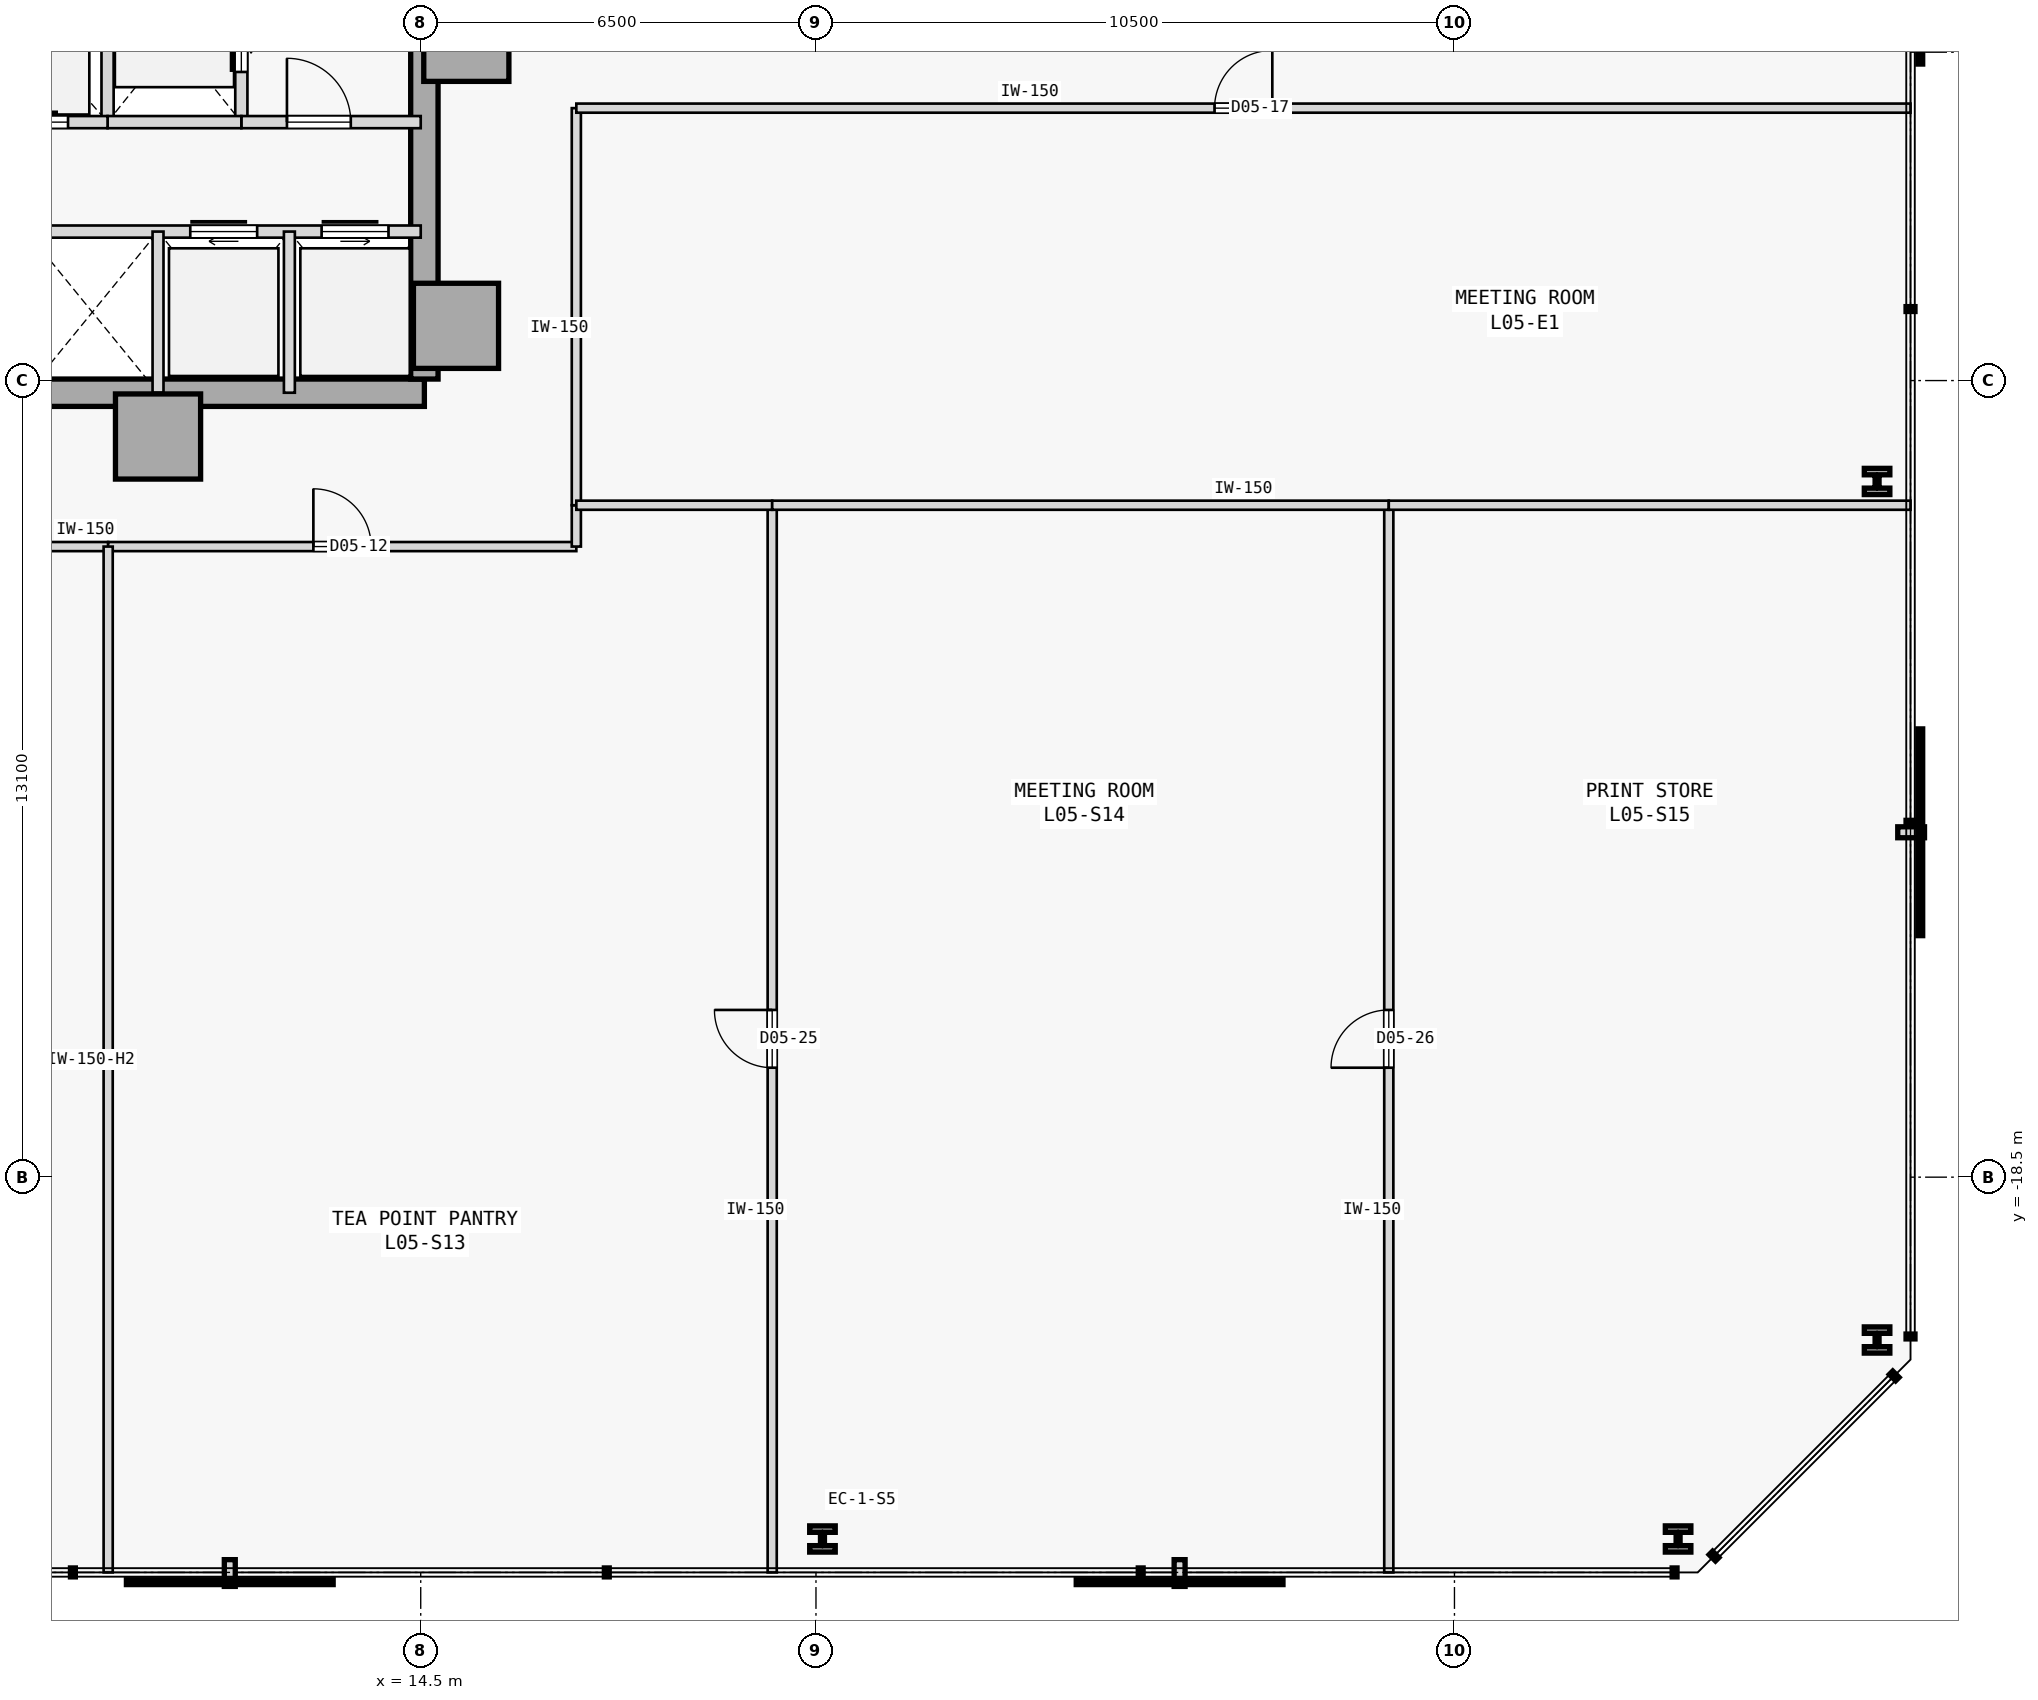
"""IFC4 building model, lengths in metres.
Left out: names, types, materials, properties, quantities, classifications, styles, units other than length and angle.
Written with IfcOpenShell. Run it as: python <this file> out.ifc"""

import sys

from ifc_helpers import new_model, si_unit, direction, frame, frame_2d, origin, origin_2d, place, context, subcontext, project, spatial, rectangle, i_section, extrude, element, fill, save


model = new_model("IFC4")
c1 = context("Model", 3, precision=1e-05, world=origin(), true_north=direction((0.0, 1.0)))
c2 = subcontext(c1, "Body", "Model", "MODEL_VIEW")
j1 = project(units=[si_unit("LENGTHUNIT", "METRE"), si_unit("PLANEANGLEUNIT", "RADIAN")], contexts=[c1])
p1 = place(None, origin())
s1 = spatial("IfcSite", under=j1, at=p1, CompositionType="ELEMENT")
p2 = place(p1, origin())
s2 = spatial("IfcBuilding", under=s1, at=p2, CompositionType="ELEMENT")
p3 = place(p2, frame((0.0, 0.0, 25.6)))
s3 = spatial("IfcBuildingStorey", under=s2, at=p3, CompositionType="ELEMENT", Elevation=25.6)
for number, where, z_axis, x_axis in (
    (1, (15.25, 0.22, 0.0), (0.0, 0.0, 1.0), (1.0, 0.0, 0.0)),
    (2, (15.08, -4.5, 0.0), (0.0, 0.0, 1.0), (1.0, 0.0, 0.0)),
    (3, (10.18, -6.32, 0.0), (0.0, 0.0, 1.0), (1.0, 0.0, 0.0)),
):
    element("IfcColumn", number, at=place(p3, frame(where, z_axis=z_axis, x_axis=x_axis)), inside=s3, PredefinedType="COLUMN", context=c2, shape_type="SweptSolid", body=[
        extrude(rectangle(XDim=1.4, YDim=1.4, at=origin_2d()), origin(), (0.0, 0.0, 1.0), 3.8),
    ])
p4 = place(p3, frame((3.7, -5.6, 0.0), z_axis=(0.0, 0.0, 1.0), x_axis=(1.0, 0.0, 0.0)))
e4 = element("IfcWall", 4, at=p4, inside=s3, PredefinedType="SHEAR", context=c2, shape_type="SweptSolid", body=[
    extrude(rectangle(XDim=10.86, YDim=0.45, at=frame_2d((5.43, 0.0))), origin(), (0.0, 0.0, 1.0), 3.575),
])
p5 = place(p3, frame((14.56, -5.375, 0.0), z_axis=(0.0, 0.0, 1.0), x_axis=(0.0, 1.0, 0.0)))
e5 = element("IfcWall", 5, at=p5, inside=s3, PredefinedType="SHEAR", context=c2, shape_type="SweptSolid", body=[
    extrude(rectangle(XDim=10.75, YDim=0.45, at=frame_2d((5.375, 0.0))), origin(), (0.0, 0.0, 1.0), 3.575),
])
for number, where, z_axis, x_axis in (
    (6, (21.107, -24.45, 0.0), (0.0, 0.0, 1.0), (1.0, 0.0, 0.0)),
    (7, (35.178, -24.45, 0.0), (0.0, 0.0, 1.0), (1.0, 0.0, 0.0)),
    (8, (38.45, -21.178, 0.0), (0.0, 0.0, 1.0), (1.0, 0.0, 0.0)),
    (9, (38.45, -7.059, 0.0), (0.0, 0.0, 1.0), (1.0, 0.0, 0.0)),
):
    element("IfcColumn", number, at=place(p3, frame(where, z_axis=z_axis, x_axis=x_axis)), inside=s3, PredefinedType="COLUMN", context=c2, shape_type="SweptSolid", body=[
        extrude(i_section(OverallWidth=0.42, OverallDepth=0.431, WebThickness=0.065, FlangeThickness=0.106, FilletRadius=0.015, at=origin_2d()), origin(), (0.0, 0.0, 1.0), 3.8),
    ])
p6 = place(p3, frame((11.55, -1.15, 0.0), z_axis=(0.0, 0.0, 1.0), x_axis=(0.0, 1.0, 0.0)))
e10 = element("IfcWall", 10, at=p6, inside=s3, PredefinedType="STANDARD", context=c2, shape_type="SweptSolid", body=[
    extrude(rectangle(XDim=2.75, YDim=0.2, at=frame_2d((1.375, 0.0))), origin(), (0.0, 0.0, 1.0), 3.575),
])
p7 = place(p6, frame((0.825, 0.0, 0.0)))
e11 = element("IfcOpeningElement", 11, at=p7, cuts=e10, PredefinedType="OPENING", context=c2, shape_type="SweptSolid", body=[
    extrude(rectangle(XDim=1.1, YDim=2.15, at=frame_2d((0.55, 1.075))), frame((0.0, 0.11, 0.0), z_axis=(0.0, -1.0, 0.0), x_axis=(1.0, 0.0, 0.0)), (0.0, 0.0, 1.0), 0.22),
])
p8 = place(p3, frame((9.35, -1.15, 0.0), z_axis=(0.0, 0.0, 1.0), x_axis=(0.0, 1.0, 0.0)))
e12 = element("IfcWall", 12, at=p8, inside=s3, PredefinedType="STANDARD", context=c2, shape_type="SweptSolid", body=[
    extrude(rectangle(XDim=2.75, YDim=0.2, at=frame_2d((1.375, 0.0))), origin(), (0.0, 0.0, 1.0), 3.575),
])
p9 = place(p3, frame((11.55, -1.15, 0.0), z_axis=(0.0, 0.0, 1.0), x_axis=(1.0, 0.0, 0.0)))
e13 = element("IfcWall", 13, at=p9, inside=s3, PredefinedType="STANDARD", context=c2, shape_type="SweptSolid", body=[
    extrude(rectangle(XDim=2.95, YDim=0.2, at=frame_2d((1.475, 0.0))), origin(), (0.0, 0.0, 1.0), 3.575),
])
p10 = place(p9, frame((0.75, 0.0, 0.0)))
e14 = element("IfcOpeningElement", 14, at=p10, cuts=e13, PredefinedType="OPENING", context=c2, shape_type="SweptSolid", body=[
    extrude(rectangle(XDim=1.05, YDim=2.18, at=frame_2d((0.525, 1.09))), frame((0.0, 0.11, 0.0), z_axis=(0.0, -1.0, 0.0), x_axis=(1.0, 0.0, 0.0)), (0.0, 0.0, 1.0), 0.22),
])
p11 = place(p3, frame((9.35, -1.15, 0.0), z_axis=(0.0, 0.0, 1.0), x_axis=(1.0, 0.0, 0.0)))
e15 = element("IfcWall", 15, at=p11, inside=s3, PredefinedType="STANDARD", context=c2, shape_type="SweptSolid", body=[
    extrude(rectangle(XDim=2.2, YDim=0.2, at=frame_2d((1.1, 0.0))), origin(), (0.0, 0.0, 1.0), 3.575),
])
p12 = place(p3, frame((6.95, -1.15, 0.0), z_axis=(0.0, 0.0, 1.0), x_axis=(1.0, 0.0, 0.0)))
e16 = element("IfcWall", 16, at=p12, inside=s3, PredefinedType="STANDARD", context=c2, shape_type="SweptSolid", body=[
    extrude(rectangle(XDim=2.4, YDim=0.2, at=frame_2d((1.2, 0.0))), origin(), (0.0, 0.0, 1.0), 3.575),
])
p13 = place(p12, frame((0.65, 0.0, 0.0)))
e17 = element("IfcOpeningElement", 17, at=p13, cuts=e16, PredefinedType="OPENING", context=c2, shape_type="SweptSolid", body=[
    extrude(rectangle(XDim=1.1, YDim=2.15, at=frame_2d((0.55, 1.075))), frame((0.0, 0.11, 0.0), z_axis=(0.0, -1.0, 0.0), x_axis=(1.0, 0.0, 0.0)), (0.0, 0.0, 1.0), 0.22),
])
p14 = place(p3, frame((3.7, -2.95, 0.0), z_axis=(0.0, 0.0, 1.0), x_axis=(1.0, 0.0, 0.0)))
e18 = element("IfcWall", 18, at=p14, inside=s3, PredefinedType="STANDARD", context=c2, shape_type="SweptSolid", body=[
    extrude(rectangle(XDim=10.8, YDim=0.2, at=frame_2d((5.4, 0.0))), origin(), (0.0, 0.0, 1.0), 3.575),
])
p15 = place(p14, frame((7.01, 0.0, 0.0)))
e19 = element("IfcOpeningElement", 19, at=p15, cuts=e18, PredefinedType="OPENING", context=c2, shape_type="SweptSolid", body=[
    extrude(rectangle(XDim=1.1, YDim=2.15, at=frame_2d((0.55, 1.075))), frame((0.0, 0.11, 0.0), z_axis=(0.0, -1.0, 0.0), x_axis=(1.0, 0.0, 0.0)), (0.0, 0.0, 1.0), 0.22),
])
p16 = place(p14, frame((9.17, 0.0, 0.0)))
e20 = element("IfcOpeningElement", 20, at=p16, cuts=e18, PredefinedType="OPENING", context=c2, shape_type="SweptSolid", body=[
    extrude(rectangle(XDim=1.1, YDim=2.15, at=frame_2d((0.55, 1.075))), frame((0.0, 0.11, 0.0), z_axis=(0.0, -1.0, 0.0), x_axis=(1.0, 0.0, 0.0)), (0.0, 0.0, 1.0), 0.22),
])
for number, where, z_axis, x_axis in (
    (21, (12.34, -5.6, 0.0), (0.0, 0.0, 1.0), (0.0, 1.0, 0.0)),
    (22, (10.18, -5.6, 0.0), (0.0, 0.0, 1.0), (0.0, 1.0, 0.0)),
):
    element("IfcWall", number, at=place(p3, frame(where, z_axis=z_axis, x_axis=x_axis)), inside=s3, PredefinedType="STANDARD", context=c2, shape_type="SweptSolid", body=[
        extrude(rectangle(XDim=2.65, YDim=0.18, at=frame_2d((1.325, 0.0))), origin(), (0.0, 0.0, 1.0), 3.575),
    ])
p17 = place(p3, frame((0.92, -8.13, 0.0), z_axis=(0.0, 0.0, 1.0), x_axis=(1.0, 0.0, 0.0)))
e23 = element("IfcWall", 23, at=p17, inside=s3, PredefinedType="PARTITIONING", context=c2, shape_type="SweptSolid", body=[
    extrude(rectangle(XDim=8.44, YDim=0.15, at=frame_2d((4.22, 0.0))), origin(), (0.0, 0.0, 1.0), 3.575),
])
p18 = place(p3, frame((9.36, -8.13, 0.0), z_axis=(0.0, 0.0, 1.0), x_axis=(1.0, 0.0, 0.0)))
e24 = element("IfcWall", 24, at=p18, inside=s3, PredefinedType="PARTITIONING", context=c2, shape_type="SweptSolid", body=[
    extrude(rectangle(XDim=7.699, YDim=0.15, at=frame_2d((3.85, 0.0))), origin(), (0.0, 0.0, 1.0), 3.575),
])
p19 = place(p18, frame((3.375, 0.0, 0.0)))
e25 = element("IfcOpeningElement", 25, at=p19, cuts=e24, PredefinedType="OPENING", context=c2, shape_type="SweptSolid", body=[
    extrude(rectangle(XDim=0.95, YDim=2.15, at=frame_2d((0.475, 1.075))), frame((0.0, 0.085, 0.0), z_axis=(0.0, -1.0, 0.0), x_axis=(1.0, 0.0, 0.0)), (0.0, 0.0, 1.0), 0.17),
])
p20 = place(p3, frame((17.059, -8.13, 0.0), z_axis=(0.0, 0.0, 1.0), x_axis=(0.0, 1.0, 0.0)))
e26 = element("IfcWall", 26, at=p20, inside=s3, PredefinedType="PARTITIONING", context=c2, shape_type="SweptSolid", body=[
    extrude(rectangle(XDim=0.68, YDim=0.15, at=frame_2d((0.34, 0.0))), origin(), (0.0, 0.0, 1.0), 3.575),
])
p21 = place(p3, frame((17.059, -7.45, 0.0), z_axis=(0.0, 0.0, 1.0), x_axis=(0.0, 1.0, 0.0)))
e27 = element("IfcWall", 27, at=p21, inside=s3, PredefinedType="PARTITIONING", context=c2, shape_type="SweptSolid", body=[
    extrude(rectangle(XDim=6.53, YDim=0.15, at=frame_2d((3.265, 0.0))), origin(), (0.0, 0.0, 1.0), 3.575),
])
p22 = place(p3, frame((17.059, -0.92, 0.0), z_axis=(0.0, 0.0, 1.0), x_axis=(1.0, 0.0, 0.0)))
e28 = element("IfcWall", 28, at=p22, inside=s3, PredefinedType="PARTITIONING", context=c2, shape_type="SweptSolid", body=[
    extrude(rectangle(XDim=21.941, YDim=0.15, at=frame_2d((10.97, 0.0))), origin(), (0.0, 0.0, 1.0), 3.575),
])
p23 = place(p22, frame((10.496, 0.0, 0.0)))
e29 = element("IfcOpeningElement", 29, at=p23, cuts=e28, PredefinedType="OPENING", context=c2, shape_type="SweptSolid", body=[
    extrude(rectangle(XDim=0.95, YDim=2.15, at=frame_2d((0.475, 1.075))), frame((0.0, 0.085, 0.0), z_axis=(0.0, -1.0, 0.0), x_axis=(1.0, 0.0, 0.0)), (0.0, 0.0, 1.0), 0.17),
])
p24 = place(p3, frame((9.36, -25.0, 0.0), z_axis=(0.0, 0.0, 1.0), x_axis=(0.0, 1.0, 0.0)))
e30 = element("IfcWall", 30, at=p24, inside=s3, PredefinedType="PARTITIONING", context=c2, shape_type="SweptSolid", body=[
    extrude(rectangle(XDim=16.87, YDim=0.15, at=frame_2d((8.435, 0.0))), origin(), (0.0, 0.0, 1.0), 2.975),
])
p25 = place(p3, frame((20.28, -25.0, 0.0), z_axis=(0.0, 0.0, 1.0), x_axis=(0.0, 1.0, 0.0)))
e31 = element("IfcWall", 31, at=p25, inside=s3, PredefinedType="PARTITIONING", context=c2, shape_type="SweptSolid", body=[
    extrude(rectangle(XDim=17.55, YDim=0.15, at=frame_2d((8.775, 0.0))), origin(), (0.0, 0.0, 1.0), 3.575),
])
p26 = place(p25, frame((8.3, 0.0, 0.0)))
e32 = element("IfcOpeningElement", 32, at=p26, cuts=e31, PredefinedType="OPENING", context=c2, shape_type="SweptSolid", body=[
    extrude(rectangle(XDim=0.95, YDim=2.15, at=frame_2d((0.475, 1.075))), frame((0.0, 0.085, 0.0), z_axis=(0.0, -1.0, 0.0), x_axis=(1.0, 0.0, 0.0)), (0.0, 0.0, 1.0), 0.17),
])
p27 = place(p3, frame((17.059, -7.45, 0.0), z_axis=(0.0, 0.0, 1.0), x_axis=(1.0, 0.0, 0.0)))
e33 = element("IfcWall", 33, at=p27, inside=s3, PredefinedType="PARTITIONING", context=c2, shape_type="SweptSolid", body=[
    extrude(rectangle(XDim=3.221, YDim=0.15, at=frame_2d((1.61, 0.0))), origin(), (0.0, 0.0, 1.0), 3.575),
])
p28 = place(p3, frame((30.42, -25.0, 0.0), z_axis=(0.0, 0.0, 1.0), x_axis=(0.0, 1.0, 0.0)))
e34 = element("IfcWall", 34, at=p28, inside=s3, PredefinedType="PARTITIONING", context=c2, shape_type="SweptSolid", body=[
    extrude(rectangle(XDim=17.55, YDim=0.15, at=frame_2d((8.775, 0.0))), origin(), (0.0, 0.0, 1.0), 3.575),
])
p29 = place(p28, frame((8.3, 0.0, 0.0)))
e35 = element("IfcOpeningElement", 35, at=p29, cuts=e34, PredefinedType="OPENING", context=c2, shape_type="SweptSolid", body=[
    extrude(rectangle(XDim=0.95, YDim=2.15, at=frame_2d((0.475, 1.075))), frame((0.0, 0.085, 0.0), z_axis=(0.0, -1.0, 0.0), x_axis=(1.0, 0.0, 0.0)), (0.0, 0.0, 1.0), 0.17),
])
p30 = place(p3, frame((20.28, -7.45, 0.0), z_axis=(0.0, 0.0, 1.0), x_axis=(1.0, 0.0, 0.0)))
e36 = element("IfcWall", 36, at=p30, inside=s3, PredefinedType="PARTITIONING", context=c2, shape_type="SweptSolid", body=[
    extrude(rectangle(XDim=10.14, YDim=0.15, at=frame_2d((5.07, 0.0))), origin(), (0.0, 0.0, 1.0), 3.575),
])
p31 = place(p3, frame((30.42, -7.45, 0.0), z_axis=(0.0, 0.0, 1.0), x_axis=(1.0, 0.0, 0.0)))
e37 = element("IfcWall", 37, at=p31, inside=s3, PredefinedType="PARTITIONING", context=c2, shape_type="SweptSolid", body=[
    extrude(rectangle(XDim=8.58, YDim=0.15, at=frame_2d((4.29, 0.0))), origin(), (0.0, 0.0, 1.0), 3.575),
])
p32 = place(p10, origin())
e38 = element("IfcDoor", 38, at=p32, inside=s3, OperationType="SINGLE_SWING_LEFT", PredefinedType="DOOR", context=c2, shape_type="SweptSolid", body=[
    extrude(rectangle(XDim=1.05, YDim=2.18, at=frame_2d((0.525, 1.09))), frame((0.0, 0.025, 0.0), z_axis=(0.0, -1.0, 0.0), x_axis=(1.0, 0.0, 0.0)), (0.0, 0.0, 1.0), 0.05),
])
fill(e14, e38)
p33 = place(p7, origin())
e39 = element("IfcDoor", 39, at=p33, inside=s3, OperationType="SLIDING_TO_RIGHT", PredefinedType="DOOR", context=c2, shape_type="SweptSolid", body=[
    extrude(rectangle(XDim=1.1, YDim=2.15, at=frame_2d((0.55, 1.075))), frame((0.0, 0.025, 0.0), z_axis=(0.0, -1.0, 0.0), x_axis=(1.0, 0.0, 0.0)), (0.0, 0.0, 1.0), 0.05),
])
fill(e11, e39)
p34 = place(p13, origin())
e40 = element("IfcDoor", 40, at=p34, inside=s3, OperationType="SLIDING_TO_RIGHT", PredefinedType="DOOR", context=c2, shape_type="SweptSolid", body=[
    extrude(rectangle(XDim=1.1, YDim=2.15, at=frame_2d((0.55, 1.075))), frame((0.0, 0.025, 0.0), z_axis=(0.0, -1.0, 0.0), x_axis=(1.0, 0.0, 0.0)), (0.0, 0.0, 1.0), 0.05),
])
fill(e17, e40)
p35 = place(p15, origin())
e41 = element("IfcDoor", 41, at=p35, inside=s3, OperationType="SLIDING_TO_RIGHT", PredefinedType="DOOR", context=c2, shape_type="SweptSolid", body=[
    extrude(rectangle(XDim=1.1, YDim=2.15, at=frame_2d((0.55, 1.075))), frame((0.0, 0.025, 0.0), z_axis=(0.0, -1.0, 0.0), x_axis=(1.0, 0.0, 0.0)), (0.0, 0.0, 1.0), 0.05),
])
fill(e19, e41)
p36 = place(p16, origin())
e42 = element("IfcDoor", 42, at=p36, inside=s3, OperationType="SLIDING_TO_LEFT", PredefinedType="DOOR", context=c2, shape_type="SweptSolid", body=[
    extrude(rectangle(XDim=1.1, YDim=2.15, at=frame_2d((0.55, 1.075))), frame((0.0, 0.025, 0.0), z_axis=(0.0, -1.0, 0.0), x_axis=(1.0, 0.0, 0.0)), (0.0, 0.0, 1.0), 0.05),
])
fill(e20, e42)
p37 = place(p19, origin())
e43 = element("IfcDoor", 43, at=p37, inside=s3, OperationType="SINGLE_SWING_LEFT", PredefinedType="DOOR", context=c2, shape_type="SweptSolid", body=[
    extrude(rectangle(XDim=0.95, YDim=2.15, at=frame_2d((0.475, 1.075))), frame((0.0, 0.025, 0.0), z_axis=(0.0, -1.0, 0.0), x_axis=(1.0, 0.0, 0.0)), (0.0, 0.0, 1.0), 0.05),
])
fill(e25, e43)
p38 = place(p23, origin())
e44 = element("IfcDoor", 44, at=p38, inside=s3, OperationType="SINGLE_SWING_RIGHT", PredefinedType="DOOR", context=c2, shape_type="SweptSolid", body=[
    extrude(rectangle(XDim=0.95, YDim=2.15, at=frame_2d((0.475, 1.075))), frame((0.0, 0.025, 0.0), z_axis=(0.0, -1.0, 0.0), x_axis=(1.0, 0.0, 0.0)), (0.0, 0.0, 1.0), 0.05),
])
fill(e29, e44)
p39 = place(p26, origin())
e45 = element("IfcDoor", 45, at=p39, inside=s3, OperationType="SINGLE_SWING_RIGHT", PredefinedType="DOOR", context=c2, shape_type="SweptSolid", body=[
    extrude(rectangle(XDim=0.95, YDim=2.15, at=frame_2d((0.475, 1.075))), frame((0.0, 0.025, 0.0), z_axis=(0.0, -1.0, 0.0), x_axis=(1.0, 0.0, 0.0)), (0.0, 0.0, 1.0), 0.05),
])
fill(e32, e45)
p40 = place(p29, origin())
e46 = element("IfcDoor", 46, at=p40, inside=s3, OperationType="SINGLE_SWING_LEFT", PredefinedType="DOOR", context=c2, shape_type="SweptSolid", body=[
    extrude(rectangle(XDim=0.95, YDim=2.15, at=frame_2d((0.475, 1.075))), frame((0.0, 0.025, 0.0), z_axis=(0.0, -1.0, 0.0), x_axis=(1.0, 0.0, 0.0)), (0.0, 0.0, 1.0), 0.05),
])
fill(e35, e46)
save(model, sys.argv[1])
